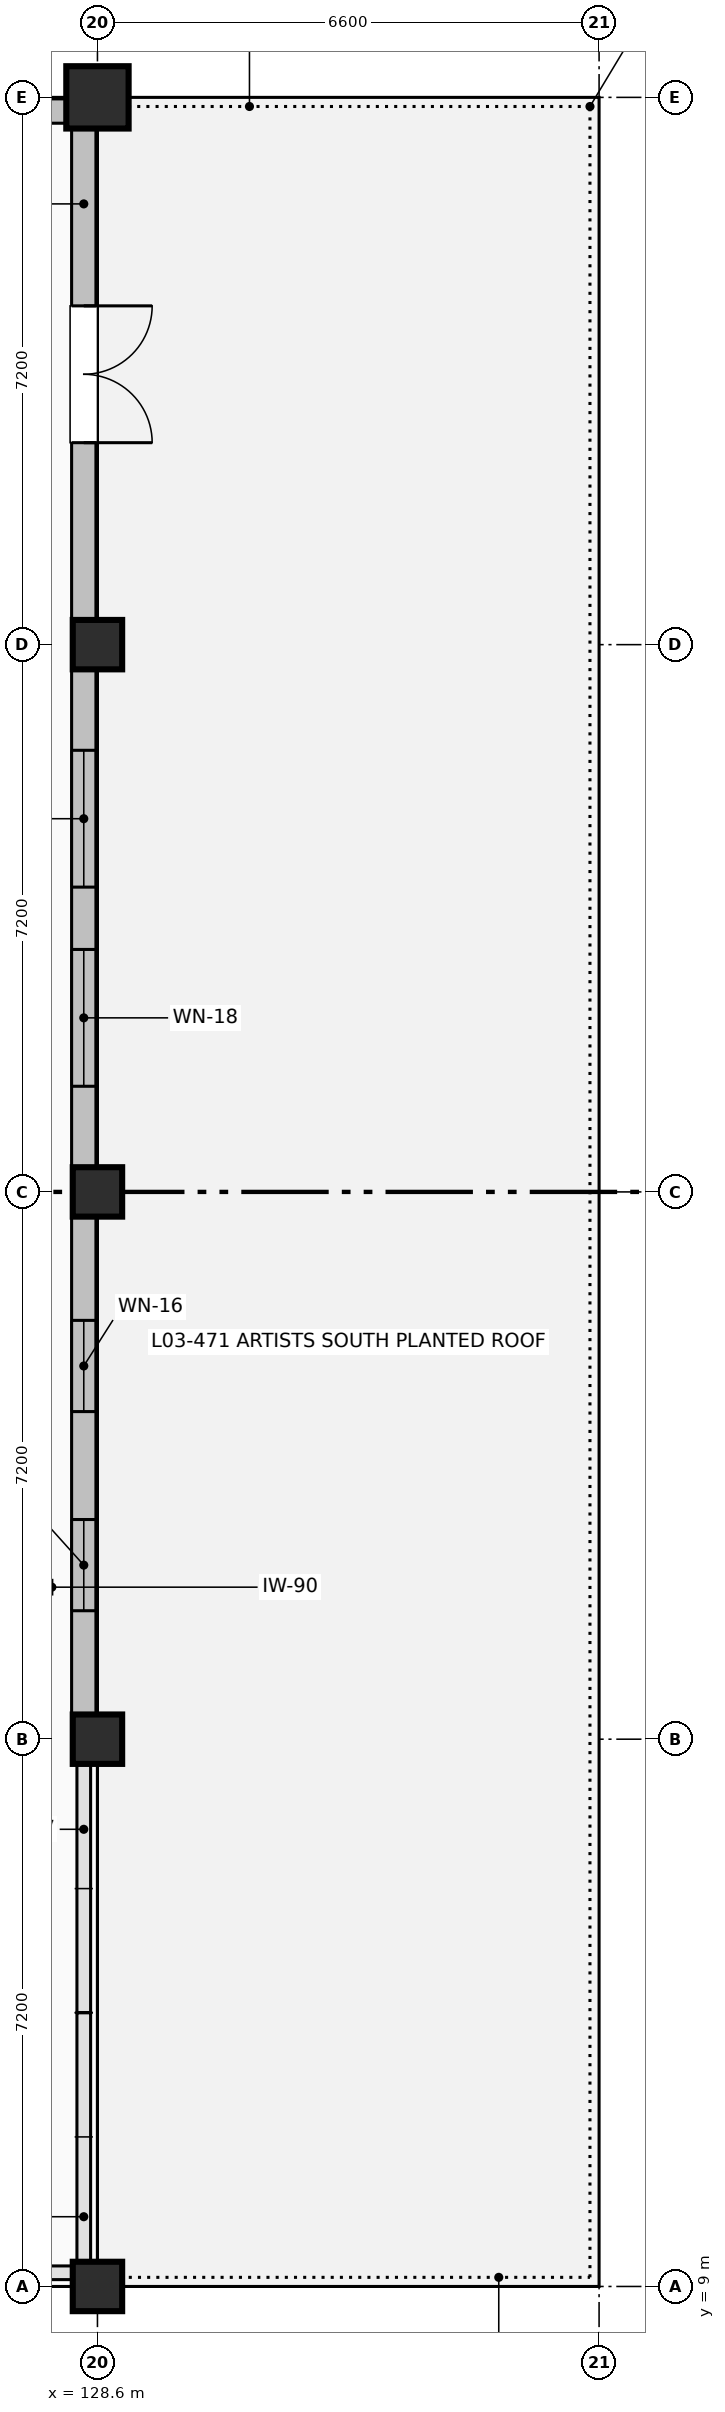
"""IFC4 building model, lengths in metres.
Left out: names, types, materials, properties, quantities, classifications, styles, units other than length and angle.
Written with IfcOpenShell. Run it as: python <this file> out.ifc"""

import sys

from ifc_helpers import new_model, si_unit, direction, frame, frame_2d, origin, origin_2d, place, context, subcontext, project, spatial, rectangle, extrude, element, fill, save


model = new_model("IFC4")
c1 = context("Model", 3, precision=1e-05, world=origin(), true_north=direction((0.0, 1.0)))
c2 = subcontext(c1, "Body", "Model", "MODEL_VIEW")
j1 = project(units=[si_unit("LENGTHUNIT", "METRE"), si_unit("PLANEANGLEUNIT", "RADIAN")], contexts=[c1])
p1 = place(None, origin())
s1 = spatial("IfcSite", under=j1, at=p1, CompositionType="ELEMENT")
p2 = place(p1, origin())
s2 = spatial("IfcBuilding", under=s1, at=p2, CompositionType="ELEMENT")
p3 = place(p2, frame((0.0, 0.0, 15.0)))
s3 = spatial("IfcBuildingStorey", under=s2, at=p3, CompositionType="ELEMENT", Elevation=15.0)
for number, where, z_axis, x_axis in (
    (1, (128.6, 9.0, 0.0), (0.0, 0.0, 1.0), (1.0, 0.0, 0.0)),
    (2, (128.6, 16.2, 0.0), (0.0, 0.0, 1.0), (1.0, 0.0, 0.0)),
    (3, (128.6, 23.4, 0.0), (0.0, 0.0, 1.0), (1.0, 0.0, 0.0)),
    (4, (128.6, 30.6, 0.0), (0.0, 0.0, 1.0), (1.0, 0.0, 0.0)),
):
    element("IfcColumn", number, at=place(p3, frame(where, z_axis=z_axis, x_axis=x_axis)), inside=s3, PredefinedType="COLUMN", context=c2, shape_type="SweptSolid", body=[
        extrude(rectangle(XDim=0.65, YDim=0.65, at=origin_2d()), origin(), (0.0, 0.0, 1.0), 4.5),
    ])
p4 = place(p3, frame((128.6, 37.8, 0.0), z_axis=(0.0, 0.0, 1.0), x_axis=(1.0, 0.0, 0.0)))
e5 = element("IfcColumn", 5, at=p4, inside=s3, PredefinedType="COLUMN", context=c2, shape_type="SweptSolid", body=[
    extrude(rectangle(XDim=0.82, YDim=0.82, at=origin_2d()), origin(), (0.0, 0.0, 1.0), 4.5),
])
p5 = place(p3, frame((128.42, 37.39, 0.0), z_axis=(0.0, 0.0, 1.0), x_axis=(0.0, -1.0, 0.0)))
e6 = element("IfcWall", 6, at=p5, inside=s3, PredefinedType="SOLIDWALL", context=c2, shape_type="SweptSolid", body=[
    extrude(rectangle(XDim=6.465, YDim=0.32, at=frame_2d((3.232, 0.0))), origin(), (0.0, 0.0, 1.0), 3.522),
])
p6 = place(p5, frame((2.333, 0.0, 0.0)))
e7 = element("IfcOpeningElement", 7, at=p6, cuts=e6, PredefinedType="OPENING", context=c2, shape_type="SweptSolid", body=[
    extrude(rectangle(XDim=1.8, YDim=2.2, at=frame_2d((0.9, 1.1))), frame((0.0, 0.17, 0.0), z_axis=(0.0, -1.0, 0.0), x_axis=(1.0, 0.0, 0.0)), (0.0, 0.0, 1.0), 0.34),
])
p7 = place(p3, frame((128.42, 30.275, 0.0), z_axis=(0.0, 0.0, 1.0), x_axis=(0.0, -1.0, 0.0)))
e8 = element("IfcWall", 8, at=p7, inside=s3, PredefinedType="SOLIDWALL", context=c2, shape_type="SweptSolid", body=[
    extrude(rectangle(XDim=6.55, YDim=0.32, at=frame_2d((3.275, 0.0))), origin(), (0.0, 0.0, 1.0), 3.522),
])
p8 = place(p7, frame((1.065, 0.0, 1.0)))
e9 = element("IfcOpeningElement", 9, at=p8, cuts=e8, PredefinedType="OPENING", context=c2, shape_type="SweptSolid", body=[
    extrude(rectangle(XDim=1.8, YDim=1.7, at=frame_2d((0.9, 0.85))), frame((0.0, 0.17, 0.0), z_axis=(0.0, -1.0, 0.0), x_axis=(1.0, 0.0, 0.0)), (0.0, 0.0, 1.0), 0.34),
])
p9 = place(p7, frame((3.685, 0.0, 1.0)))
e10 = element("IfcOpeningElement", 10, at=p9, cuts=e8, PredefinedType="OPENING", context=c2, shape_type="SweptSolid", body=[
    extrude(rectangle(XDim=1.8, YDim=1.7, at=frame_2d((0.9, 0.85))), frame((0.0, 0.17, 0.0), z_axis=(0.0, -1.0, 0.0), x_axis=(1.0, 0.0, 0.0)), (0.0, 0.0, 1.0), 0.34),
])
p10 = place(p3, frame((128.42, 23.075, 0.0), z_axis=(0.0, 0.0, 1.0), x_axis=(0.0, -1.0, 0.0)))
e11 = element("IfcWall", 11, at=p10, inside=s3, PredefinedType="SOLIDWALL", context=c2, shape_type="SweptSolid", body=[
    extrude(rectangle(XDim=6.55, YDim=0.32, at=frame_2d((3.275, 0.0))), origin(), (0.0, 0.0, 1.0), 3.522),
])
p11 = place(p10, frame((1.365, 0.0, 1.0)))
e12 = element("IfcOpeningElement", 12, at=p11, cuts=e11, PredefinedType="OPENING", context=c2, shape_type="SweptSolid", body=[
    extrude(rectangle(XDim=1.2, YDim=1.7, at=frame_2d((0.6, 0.85))), frame((0.0, 0.17, 0.0), z_axis=(0.0, -1.0, 0.0), x_axis=(1.0, 0.0, 0.0)), (0.0, 0.0, 1.0), 0.34),
])
p12 = place(p10, frame((3.985, 0.0, 1.0)))
e13 = element("IfcOpeningElement", 13, at=p12, cuts=e11, PredefinedType="OPENING", context=c2, shape_type="SweptSolid", body=[
    extrude(rectangle(XDim=1.2, YDim=1.7, at=frame_2d((0.6, 0.85))), frame((0.0, 0.17, 0.0), z_axis=(0.0, -1.0, 0.0), x_axis=(1.0, 0.0, 0.0)), (0.0, 0.0, 1.0), 0.34),
])
p13 = place(p3, frame((122.41, 37.62, 0.0), z_axis=(0.0, 0.0, 1.0), x_axis=(1.0, 0.0, 0.0)))
e14 = element("IfcWall", 14, at=p13, inside=s3, PredefinedType="SOLIDWALL", context=c2, shape_type="SweptSolid", body=[
    extrude(rectangle(XDim=5.78, YDim=0.32, at=frame_2d((2.89, 0.0))), origin(), (0.0, 0.0, 1.0), 3.522),
])
p14 = place(p13, frame((1.84, 0.0, 1.0)))
e15 = element("IfcOpeningElement", 15, at=p14, cuts=e14, PredefinedType="OPENING", context=c2, shape_type="SweptSolid", body=[
    extrude(rectangle(XDim=2.1, YDim=1.7, at=frame_2d((1.05, 0.85))), frame((0.0, 0.17, 0.0), z_axis=(0.0, -1.0, 0.0), x_axis=(1.0, 0.0, 0.0)), (0.0, 0.0, 1.0), 0.34),
])
p15 = place(p3, frame((123.8, 18.2, 0.0), z_axis=(0.0, 0.0, 1.0), x_axis=(1.0, 0.0, 0.0)))
e16 = element("IfcWall", 16, at=p15, inside=s3, PredefinedType="PARTITIONING", context=c2, shape_type="SweptSolid", body=[
    extrude(rectangle(XDim=4.2, YDim=0.18, at=frame_2d((2.1, 0.0))), origin(), (0.0, 0.0, 1.0), 4.192),
])
p16 = place(p15, frame((1.575, 0.0, 0.0)))
e17 = element("IfcOpeningElement", 17, at=p16, cuts=e16, PredefinedType="OPENING", context=c2, shape_type="SweptSolid", body=[
    extrude(rectangle(XDim=1.05, YDim=2.1, at=frame_2d((0.525, 1.05))), frame((0.0, 0.1, 0.0), z_axis=(0.0, -1.0, 0.0), x_axis=(1.0, 0.0, 0.0)), (0.0, 0.0, 1.0), 0.2),
])
p17 = place(p6, origin())
e18 = element("IfcDoor", 18, at=p17, inside=s3, OperationType="DOUBLE_DOOR_SINGLE_SWING", PredefinedType="DOOR", context=c2, shape_type="SweptSolid", body=[
    extrude(rectangle(XDim=1.8, YDim=2.2, at=frame_2d((0.9, 1.1))), frame((0.0, 0.025, 0.0), z_axis=(0.0, -1.0, 0.0), x_axis=(1.0, 0.0, 0.0)), (0.0, 0.0, 1.0), 0.05),
])
fill(e7, e18)
p18 = place(p8, origin())
e19 = element("IfcWindow", 19, at=p18, inside=s3, PartitioningType="SINGLE_PANEL", PredefinedType="WINDOW", context=c2, shape_type="SweptSolid", body=[
    extrude(rectangle(XDim=1.8, YDim=1.7, at=frame_2d((0.9, 0.85))), frame((0.0, 0.03, 0.0), z_axis=(0.0, -1.0, 0.0), x_axis=(1.0, 0.0, 0.0)), (0.0, 0.0, 1.0), 0.06),
])
fill(e9, e19)
p19 = place(p9, origin())
e20 = element("IfcWindow", 20, at=p19, inside=s3, PartitioningType="SINGLE_PANEL", PredefinedType="WINDOW", context=c2, shape_type="SweptSolid", body=[
    extrude(rectangle(XDim=1.8, YDim=1.7, at=frame_2d((0.9, 0.85))), frame((0.0, 0.03, 0.0), z_axis=(0.0, -1.0, 0.0), x_axis=(1.0, 0.0, 0.0)), (0.0, 0.0, 1.0), 0.06),
])
fill(e10, e20)
p20 = place(p11, origin())
e21 = element("IfcWindow", 21, at=p20, inside=s3, PartitioningType="SINGLE_PANEL", PredefinedType="WINDOW", context=c2, shape_type="SweptSolid", body=[
    extrude(rectangle(XDim=1.2, YDim=1.7, at=frame_2d((0.6, 0.85))), frame((0.0, 0.03, 0.0), z_axis=(0.0, -1.0, 0.0), x_axis=(1.0, 0.0, 0.0)), (0.0, 0.0, 1.0), 0.06),
])
fill(e12, e21)
p21 = place(p12, origin())
e22 = element("IfcWindow", 22, at=p21, inside=s3, PartitioningType="SINGLE_PANEL", PredefinedType="WINDOW", context=c2, shape_type="SweptSolid", body=[
    extrude(rectangle(XDim=1.2, YDim=1.7, at=frame_2d((0.6, 0.85))), frame((0.0, 0.03, 0.0), z_axis=(0.0, -1.0, 0.0), x_axis=(1.0, 0.0, 0.0)), (0.0, 0.0, 1.0), 0.06),
])
fill(e13, e22)
save(model, sys.argv[1])
